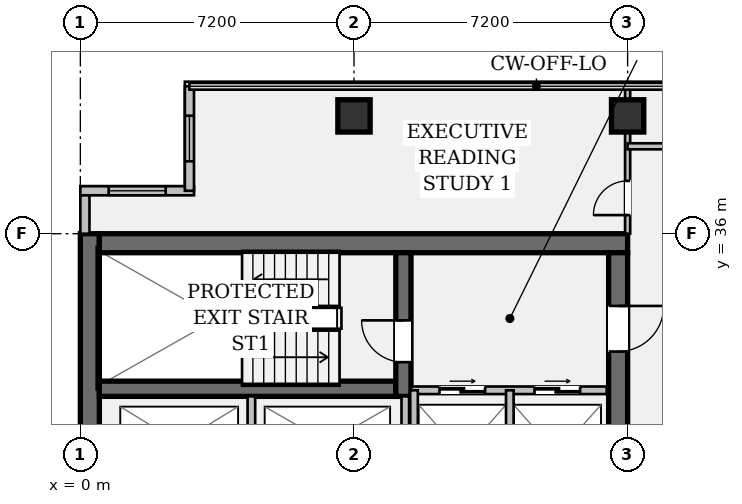
"""IFC4 building model, lengths in metres.
Left out: names, types, materials, properties, quantities, classifications, styles, units other than length and angle.
Written with IfcOpenShell. Run it as: python <this file> out.ifc"""

import sys

from ifc_helpers import new_model, si_unit, direction, frame, frame_2d, origin, origin_2d, place, context, subcontext, project, spatial, rectangle, hollow_rectangle, extrude, element, fill, save


model = new_model("IFC4")
c1 = context("Model", 3, precision=1e-05, world=origin(), true_north=direction((0.0, 1.0)))
c2 = subcontext(c1, "Body", "Model", "MODEL_VIEW")
j1 = project(units=[si_unit("LENGTHUNIT", "METRE"), si_unit("PLANEANGLEUNIT", "RADIAN")], contexts=[c1])
p1 = place(None, origin())
s1 = spatial("IfcSite", under=j1, at=p1, CompositionType="ELEMENT")
p2 = place(p1, origin())
s2 = spatial("IfcBuilding", under=s1, at=p2, CompositionType="ELEMENT")
p3 = place(p2, frame((0.0, 0.0, 176.75)))
s3 = spatial("IfcBuildingStorey", under=s2, at=p3, CompositionType="ELEMENT", Elevation=176.75)
p4 = place(p3, frame((0.25, 7.2, 0.0), z_axis=(0.0, 0.0, 1.0), x_axis=(0.0, 1.0, 0.0)))
e1 = element("IfcWall", 1, at=p4, inside=s3, PredefinedType="SHEAR", context=c2, shape_type="SweptSolid", body=[
    extrude(rectangle(XDim=28.8, YDim=0.5, at=frame_2d((14.4, 0.0))), origin(), (0.0, 0.0, 1.0), 3.24),
])
p5 = place(p3, frame((0.5, 35.75, 0.0), z_axis=(0.0, 0.0, 1.0), x_axis=(1.0, 0.0, 0.0)))
e2 = element("IfcWall", 2, at=p5, inside=s3, PredefinedType="SHEAR", context=c2, shape_type="SweptSolid", body=[
    extrude(rectangle(XDim=13.9, YDim=0.5, at=frame_2d((6.95, 0.0))), origin(), (0.0, 0.0, 1.0), 3.24),
])
p6 = place(p3, frame((14.15, 35.5, 0.0), z_axis=(0.0, 0.0, 1.0), x_axis=(0.0, -1.0, 0.0)))
e3 = element("IfcWall", 3, at=p6, inside=s3, PredefinedType="SHEAR", context=c2, shape_type="SweptSolid", body=[
    extrude(rectangle(XDim=27.8, YDim=0.5, at=frame_2d((13.9, 0.0))), origin(), (0.0, 0.0, 1.0), 3.24),
])
p7 = place(p6, frame((1.4, 0.0, 0.0)))
e4 = element("IfcOpeningElement", 4, at=p7, cuts=e3, PredefinedType="OPENING", context=c2, shape_type="SweptSolid", body=[
    extrude(rectangle(XDim=1.2, YDim=2.15, at=frame_2d((0.6, 1.075))), frame((0.0, 0.262, 0.0), z_axis=(0.0, -1.0, 0.0), x_axis=(1.0, 0.0, 0.0)), (0.0, 0.0, 1.0), 0.524),
])
p8 = place(p6, frame((25.35, 0.0, 0.0)))
e5 = element("IfcOpeningElement", 5, at=p8, cuts=e3, PredefinedType="OPENING", context=c2, shape_type="SweptSolid", body=[
    extrude(rectangle(XDim=1.2, YDim=2.15, at=frame_2d((0.6, 1.075))), frame((0.0, 0.262, 0.0), z_axis=(0.0, -1.0, 0.0), x_axis=(1.0, 0.0, 0.0)), (0.0, 0.0, 1.0), 0.524),
])
p9 = place(p6, frame((14.7, 0.0, 0.0)))
e6 = element("IfcOpeningElement", 6, at=p9, cuts=e3, PredefinedType="OPENING", context=c2, shape_type="SweptSolid", body=[
    extrude(rectangle(XDim=1.6, YDim=2.2, at=frame_2d((0.8, 1.1))), frame((0.0, 0.262, 0.0), z_axis=(0.0, -1.0, 0.0), x_axis=(1.0, 0.0, 0.0)), (0.0, 0.0, 1.0), 0.524),
])
p10 = place(p3, frame((0.5, 31.92, 0.0), z_axis=(0.0, 0.0, 1.0), x_axis=(1.0, 0.0, 0.0)))
e7 = element("IfcWall", 7, at=p10, inside=s3, PredefinedType="SHEAR", context=c2, shape_type="SweptSolid", body=[
    extrude(rectangle(XDim=7.8, YDim=0.4, at=frame_2d((3.9, 0.0))), origin(), (0.0, 0.0, 1.0), 3.24),
])
p11 = place(p3, frame((8.5, 31.72, 0.0), z_axis=(0.0, 0.0, 1.0), x_axis=(0.0, 1.0, 0.0)))
e8 = element("IfcWall", 8, at=p11, inside=s3, PredefinedType="SHEAR", context=c2, shape_type="SweptSolid", body=[
    extrude(rectangle(XDim=3.78, YDim=0.4, at=frame_2d((1.89, 0.0))), origin(), (0.0, 0.0, 1.0), 3.24),
])
p12 = place(p11, frame((0.9, 0.0, 0.0)))
e9 = element("IfcOpeningElement", 9, at=p12, cuts=e8, PredefinedType="OPENING", context=c2, shape_type="SweptSolid", body=[
    extrude(rectangle(XDim=1.1, YDim=2.15, at=frame_2d((0.55, 1.075))), frame((0.0, 0.212, 0.0), z_axis=(0.0, -1.0, 0.0), x_axis=(1.0, 0.0, 0.0)), (0.0, 0.0, 1.0), 0.424),
])
for number, where, z_axis, x_axis in (
    (10, (7.2, 39.1, 0.0), (0.0, 0.0, 1.0), (1.0, 0.0, 0.0)),
    (11, (14.4, 39.1, 0.0), (0.0, 0.0, 1.0), (1.0, 0.0, 0.0)),
):
    element("IfcColumn", number, at=place(p3, frame(where, z_axis=z_axis, x_axis=x_axis)), inside=s3, PredefinedType="COLUMN", context=c2, shape_type="SweptSolid", body=[
        extrude(hollow_rectangle(XDim=0.85, YDim=0.85, WallThickness=0.05, at=origin_2d()), origin(), (0.0, 0.0, 1.0), 3.24),
    ])
p13 = place(p3, frame((0.12, 36.0, 0.0), z_axis=(0.0, 0.0, 1.0), x_axis=(0.0, 1.0, 0.0)))
e12 = element("IfcWall", 12, at=p13, inside=s3, PredefinedType="STANDARD", context=c2, shape_type="SweptSolid", body=[
    extrude(rectangle(XDim=1.13, YDim=0.24, at=frame_2d((0.565, 0.0))), origin(), (0.0, 0.0, 1.0), 3.24),
])
p14 = place(p3, frame((0.0, 37.13, 0.0), z_axis=(0.0, 0.0, 1.0), x_axis=(1.0, 0.0, 0.0)))
e13 = element("IfcWall", 13, at=p14, inside=s3, PredefinedType="STANDARD", context=c2, shape_type="SweptSolid", body=[
    extrude(rectangle(XDim=2.99, YDim=0.24, at=frame_2d((1.495, 0.0))), origin(), (0.0, 0.0, 1.0), 3.24),
])
p15 = place(p14, frame((0.745, 0.0, 0.95)))
e14 = element("IfcOpeningElement", 14, at=p15, cuts=e13, PredefinedType="OPENING", context=c2, shape_type="SweptSolid", body=[
    extrude(rectangle(XDim=1.5, YDim=1.8, at=frame_2d((0.75, 0.9))), frame((0.0, 0.132, 0.0), z_axis=(0.0, -1.0, 0.0), x_axis=(1.0, 0.0, 0.0)), (0.0, 0.0, 1.0), 0.264),
])
p16 = place(p3, frame((2.87, 37.13, 0.0), z_axis=(0.0, 0.0, 1.0), x_axis=(0.0, 1.0, 0.0)))
e15 = element("IfcWall", 15, at=p16, inside=s3, PredefinedType="STANDARD", context=c2, shape_type="SweptSolid", body=[
    extrude(rectangle(XDim=2.75, YDim=0.24, at=frame_2d((1.375, 0.0))), origin(), (0.0, 0.0, 1.0), 3.24),
])
p17 = place(p16, frame((0.775, 0.0, 0.95)))
e16 = element("IfcOpeningElement", 16, at=p17, cuts=e15, PredefinedType="OPENING", context=c2, shape_type="SweptSolid", body=[
    extrude(rectangle(XDim=1.2, YDim=1.8, at=frame_2d((0.6, 0.9))), frame((0.0, 0.132, 0.0), z_axis=(0.0, -1.0, 0.0), x_axis=(1.0, 0.0, 0.0)), (0.0, 0.0, 1.0), 0.264),
])
p18 = place(p3, frame((8.7, 31.88, 0.0), z_axis=(0.0, 0.0, 1.0), x_axis=(1.0, 0.0, 0.0)))
e17 = element("IfcWall", 17, at=p18, inside=s3, PredefinedType="PARTITIONING", context=c2, shape_type="SweptSolid", body=[
    extrude(rectangle(XDim=5.15, YDim=0.2, at=frame_2d((2.575, 0.0))), origin(), (0.0, 0.0, 1.0), 3.24),
])
p19 = place(p18, frame((0.75, 0.0, 0.0)))
e18 = element("IfcOpeningElement", 18, at=p19, cuts=e17, PredefinedType="OPENING", context=c2, shape_type="SweptSolid", body=[
    extrude(rectangle(XDim=1.2, YDim=2.2, at=frame_2d((0.6, 1.1))), frame((0.0, 0.112, 0.0), z_axis=(0.0, -1.0, 0.0), x_axis=(1.0, 0.0, 0.0)), (0.0, 0.0, 1.0), 0.224),
])
p20 = place(p18, frame((3.25, 0.0, 0.0)))
e19 = element("IfcOpeningElement", 19, at=p20, cuts=e17, PredefinedType="OPENING", context=c2, shape_type="SweptSolid", body=[
    extrude(rectangle(XDim=1.2, YDim=2.2, at=frame_2d((0.6, 1.1))), frame((0.0, 0.112, 0.0), z_axis=(0.0, -1.0, 0.0), x_axis=(1.0, 0.0, 0.0)), (0.0, 0.0, 1.0), 0.224),
])
for number, where, z_axis, x_axis in (
    (20, (8.78, 28.78, 0.0), (0.0, 0.0, 1.0), (0.0, 1.0, 0.0)),
    (21, (11.3, 28.78, 0.0), (0.0, 0.0, 1.0), (0.0, 1.0, 0.0)),
):
    element("IfcWall", number, at=place(p3, frame(where, z_axis=z_axis, x_axis=x_axis)), inside=s3, PredefinedType="PARTITIONING", context=c2, shape_type="SweptSolid", body=[
        extrude(rectangle(XDim=3.1, YDim=0.2, at=frame_2d((1.55, 0.0))), origin(), (0.0, 0.0, 1.0), 3.24),
    ])
for number, where, z_axis, x_axis in (
    (22, (4.5, 28.78, 0.0), (0.0, 0.0, 1.0), (0.0, 1.0, 0.0)),
    (23, (8.55, 28.78, 0.0), (0.0, 0.0, 1.0), (0.0, 1.0, 0.0)),
):
    element("IfcWall", number, at=place(p3, frame(where, z_axis=z_axis, x_axis=x_axis)), inside=s3, PredefinedType="PARTITIONING", context=c2, shape_type="SweptSolid", body=[
        extrude(rectangle(XDim=2.94, YDim=0.2, at=frame_2d((1.47, 0.0))), origin(), (0.0, 0.0, 1.0), 3.24),
    ])
p21 = place(p3, frame((14.4, 36.0, 0.0), z_axis=(0.0, 0.0, 1.0), x_axis=(0.0, 1.0, 0.0)))
e24 = element("IfcWall", 24, at=p21, inside=s3, PredefinedType="PARTITIONING", context=c2, shape_type="SweptSolid", body=[
    extrude(rectangle(XDim=3.88, YDim=0.135, at=frame_2d((1.94, 0.0))), origin(), (0.0, 0.0, 1.0), 2.603),
])
p22 = place(p21, frame((0.49, 0.0, 0.0)))
e25 = element("IfcOpeningElement", 25, at=p22, cuts=e24, PredefinedType="OPENING", context=c2, shape_type="SweptSolid", body=[
    extrude(rectangle(XDim=0.9, YDim=2.15, at=frame_2d((0.45, 1.075))), frame((0.0, 0.08, 0.0), z_axis=(0.0, -1.0, 0.0), x_axis=(1.0, 0.0, 0.0)), (0.0, 0.0, 1.0), 0.159),
])
p23 = place(p3, frame((14.4, 38.3, 0.0), z_axis=(0.0, 0.0, 1.0), x_axis=(1.0, 0.0, 0.0)))
e26 = element("IfcWall", 26, at=p23, inside=s3, PredefinedType="PARTITIONING", context=c2, shape_type="SweptSolid", body=[
    extrude(rectangle(XDim=2.95, YDim=0.16, at=frame_2d((1.475, 0.0))), origin(), (0.0, 0.0, 1.0), 2.603),
])
p24 = place(p23, frame((1.7, 0.0, 0.0)))
e27 = element("IfcOpeningElement", 27, at=p24, cuts=e26, PredefinedType="OPENING", context=c2, shape_type="SweptSolid", body=[
    extrude(rectangle(XDim=0.98, YDim=2.15, at=frame_2d((0.49, 1.075))), frame((0.0, 0.092, 0.0), z_axis=(0.0, -1.0, 0.0), x_axis=(1.0, 0.0, 0.0)), (0.0, 0.0, 1.0), 0.184),
])
p25 = place(p15, origin())
e28 = element("IfcWindow", 28, at=p25, inside=s3, PartitioningType="SINGLE_PANEL", PredefinedType="WINDOW", context=c2, shape_type="SweptSolid", body=[
    extrude(rectangle(XDim=1.5, YDim=1.8, at=frame_2d((0.75, 0.9))), frame((0.0, 0.03, 0.0), z_axis=(0.0, -1.0, 0.0), x_axis=(1.0, 0.0, 0.0)), (0.0, 0.0, 1.0), 0.06),
])
fill(e14, e28)
p26 = place(p17, origin())
e29 = element("IfcWindow", 29, at=p26, inside=s3, PartitioningType="SINGLE_PANEL", PredefinedType="WINDOW", context=c2, shape_type="SweptSolid", body=[
    extrude(rectangle(XDim=1.2, YDim=1.8, at=frame_2d((0.6, 0.9))), frame((0.0, 0.03, 0.0), z_axis=(0.0, -1.0, 0.0), x_axis=(1.0, 0.0, 0.0)), (0.0, 0.0, 1.0), 0.06),
])
fill(e16, e29)
p27 = place(p12, origin())
e30 = element("IfcDoor", 30, at=p27, inside=s3, OperationType="SINGLE_SWING_RIGHT", PredefinedType="DOOR", context=c2, shape_type="SweptSolid", body=[
    extrude(rectangle(XDim=1.1, YDim=2.15, at=frame_2d((0.55, 1.075))), frame((0.0, 0.025, 0.0), z_axis=(0.0, -1.0, 0.0), x_axis=(1.0, 0.0, 0.0)), (0.0, 0.0, 1.0), 0.05),
])
fill(e9, e30)
p28 = place(p7, origin())
e31 = element("IfcDoor", 31, at=p28, inside=s3, OperationType="SINGLE_SWING_LEFT", PredefinedType="DOOR", context=c2, shape_type="SweptSolid", body=[
    extrude(rectangle(XDim=1.2, YDim=2.15, at=frame_2d((0.6, 1.075))), frame((0.0, 0.025, 0.0), z_axis=(0.0, -1.0, 0.0), x_axis=(1.0, 0.0, 0.0)), (0.0, 0.0, 1.0), 0.05),
])
fill(e4, e31)
p29 = place(p19, origin())
e32 = element("IfcDoor", 32, at=p29, inside=s3, OperationType="DOUBLE_DOOR_SLIDING", PredefinedType="DOOR", context=c2, shape_type="SweptSolid", body=[
    extrude(rectangle(XDim=1.2, YDim=2.2, at=frame_2d((0.6, 1.1))), frame((0.0, 0.025, 0.0), z_axis=(0.0, -1.0, 0.0), x_axis=(1.0, 0.0, 0.0)), (0.0, 0.0, 1.0), 0.05),
])
fill(e18, e32)
p30 = place(p20, origin())
e33 = element("IfcDoor", 33, at=p30, inside=s3, OperationType="DOUBLE_DOOR_SLIDING", PredefinedType="DOOR", context=c2, shape_type="SweptSolid", body=[
    extrude(rectangle(XDim=1.2, YDim=2.2, at=frame_2d((0.6, 1.1))), frame((0.0, 0.025, 0.0), z_axis=(0.0, -1.0, 0.0), x_axis=(1.0, 0.0, 0.0)), (0.0, 0.0, 1.0), 0.05),
])
fill(e19, e33)
p31 = place(p22, origin())
e34 = element("IfcDoor", 34, at=p31, inside=s3, OperationType="SINGLE_SWING_LEFT", PredefinedType="DOOR", context=c2, shape_type="SweptSolid", body=[
    extrude(rectangle(XDim=0.9, YDim=2.15, at=frame_2d((0.45, 1.075))), frame((0.0, 0.025, 0.0), z_axis=(0.0, -1.0, 0.0), x_axis=(1.0, 0.0, 0.0)), (0.0, 0.0, 1.0), 0.05),
])
fill(e25, e34)
save(model, sys.argv[1])
